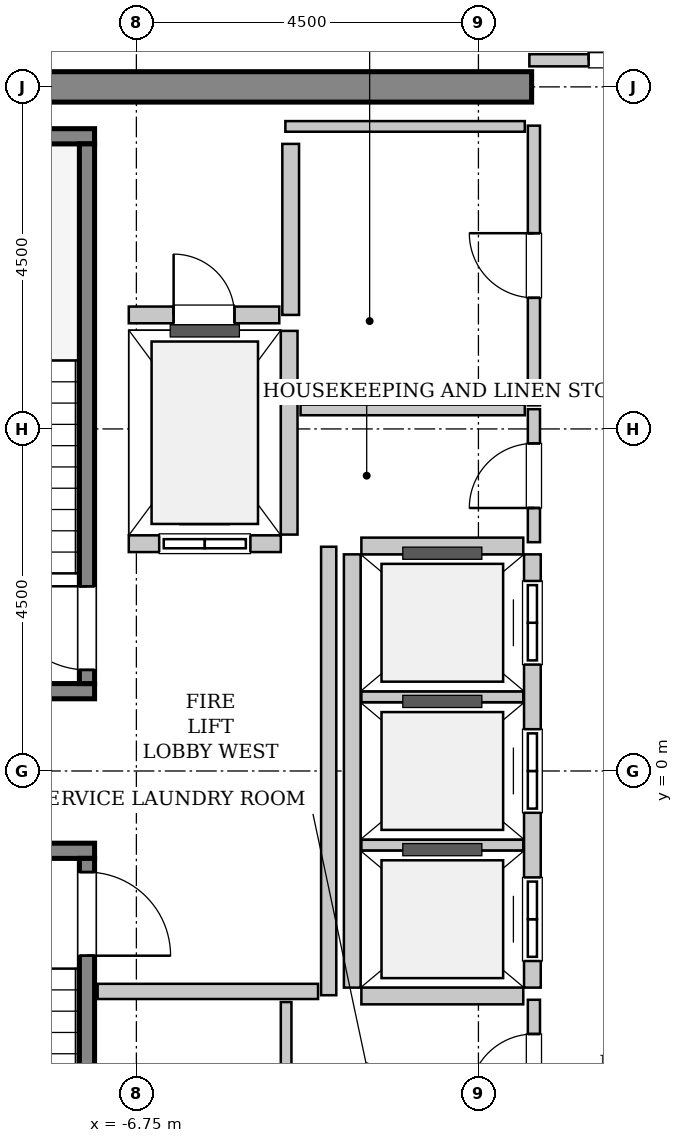
"""IFC4 building model, lengths in metres.
Left out: names, types, materials, properties, quantities, classifications, styles, units other than length and angle.
Written with IfcOpenShell. Run it as: python <this file> out.ifc"""

import sys

from ifc_helpers import new_model, si_unit, direction, frame, frame_2d, origin, place, context, subcontext, project, spatial, rectangle, extrude, source, transform, mapped, element, fill, save


model = new_model("IFC4")
c1 = context("Model", 3, precision=1e-05, world=origin(), true_north=direction((0.0, 1.0)))
c2 = subcontext(c1, "Body", "Model", "MODEL_VIEW")
j1 = project(units=[si_unit("LENGTHUNIT", "METRE"), si_unit("PLANEANGLEUNIT", "RADIAN")], contexts=[c1])
p1 = place(None, origin())
s1 = spatial("IfcSite", under=j1, at=p1, CompositionType="ELEMENT")
p2 = place(p1, origin())
s2 = spatial("IfcBuilding", under=s1, at=p2, CompositionType="ELEMENT")
p3 = place(p2, frame((0.0, 0.0, 333.8)))
s3 = spatial("IfcBuildingStorey", under=s2, at=p3, CompositionType="ELEMENT", Elevation=333.8)
m1 = source(origin(), c2, "Body", "SweptSolid", [
    extrude(rectangle(XDim=9.9, YDim=0.4, at=frame_2d((4.95, 0.0))), origin(), (0.0, 0.0, 1.0), 3.8),
])
p4 = place(p3, frame((-11.45, 9.0, 0.0), z_axis=(0.0, 0.0, 1.0), x_axis=(1.0, 0.0, 0.0)))
e1 = element("IfcWall", 1, at=p4, inside=s3, PredefinedType="SHEAR", context=c2, shape_type="MappedRepresentation", body=[
    mapped(m1, transform((0.0, 0.0, 0.0), x_axis=(1.0, 0.0, 0.0), y_axis=(0.0, 1.0, 0.0), z_axis=(0.0, 0.0, 1.0), scale=1.0)),
])
m2 = source(origin(), c2, "Body", "SweptSolid", [
    extrude(rectangle(XDim=3.4, YDim=0.2, at=frame_2d((1.7, 0.0))), origin(), (0.0, 0.0, 1.0), 3.8),
])
p5 = place(p3, frame((-7.3, 1.05, 0.0), z_axis=(0.0, 0.0, 1.0), x_axis=(-1.0, 0.0, 0.0)))
e2 = element("IfcWall", 2, at=p5, inside=s3, PredefinedType="SOLIDWALL", context=c2, shape_type="MappedRepresentation", body=[
    mapped(m2, transform((0.0, 0.0, 0.0), x_axis=(1.0, 0.0, 0.0), y_axis=(0.0, 1.0, 0.0), z_axis=(0.0, 0.0, 1.0), scale=1.0)),
])
m3 = source(origin(), c2, "Body", "SweptSolid", [
    extrude(rectangle(XDim=3.755, YDim=0.2, at=frame_2d((1.877, 0.0))), origin(), (0.0, 0.0, 1.0), 3.8),
])
p6 = place(p3, frame((-7.3, 8.35, 0.0), z_axis=(0.0, 0.0, 1.0), x_axis=(-1.0, 0.0, 0.0)))
e3 = element("IfcWall", 3, at=p6, inside=s3, PredefinedType="SOLIDWALL", context=c2, shape_type="MappedRepresentation", body=[
    mapped(m3, transform((0.0, 0.0, 0.0), x_axis=(1.0, 0.0, 0.0), y_axis=(0.0, 1.0, 0.0), z_axis=(0.0, 0.0, 1.0), scale=1.0)),
])
m4 = source(origin(), c2, "Body", "SweptSolid", [
    extrude(rectangle(XDim=7.1, YDim=0.2, at=frame_2d((3.55, 0.0))), origin(), (0.0, 0.0, 1.0), 3.8),
])
p7 = place(p3, frame((-7.4, 1.15, 0.0), z_axis=(0.0, 0.0, 1.0), x_axis=(0.0, 1.0, 0.0)))
e4 = element("IfcWall", 4, at=p7, inside=s3, PredefinedType="SOLIDWALL", context=c2, shape_type="MappedRepresentation", body=[
    mapped(m4, transform((0.0, 0.0, 0.0), x_axis=(1.0, 0.0, 0.0), y_axis=(0.0, 1.0, 0.0), z_axis=(0.0, 0.0, 1.0), scale=1.0)),
])
p8 = place(p7, frame((0.18, 0.0, 0.0)))
e5 = element("IfcOpeningElement", 5, at=p8, cuts=e4, PredefinedType="OPENING", context=c2, shape_type="SweptSolid", body=[
    extrude(rectangle(XDim=1.1, YDim=2.15, at=frame_2d((0.55, 1.075))), frame((0.0, 0.11, 0.0), z_axis=(0.0, -1.0, 0.0), x_axis=(1.0, 0.0, 0.0)), (0.0, 0.0, 1.0), 0.22),
])
p9 = place(p3, frame((-10.7, -1.05, 0.0), z_axis=(0.0, 0.0, 1.0), x_axis=(1.0, 0.0, 0.0)))
e6 = element("IfcWall", 6, at=p9, inside=s3, PredefinedType="SOLIDWALL", context=c2, shape_type="MappedRepresentation", body=[
    mapped(m2, transform((0.0, 0.0, 0.0), x_axis=(1.0, 0.0, 0.0), y_axis=(0.0, 1.0, 0.0), z_axis=(0.0, 0.0, 1.0), scale=1.0)),
])
p10 = place(p3, frame((-7.4, -1.15, 0.0), z_axis=(0.0, 0.0, 1.0), x_axis=(0.0, -1.0, 0.0)))
e7 = element("IfcWall", 7, at=p10, inside=s3, PredefinedType="SOLIDWALL", context=c2, shape_type="MappedRepresentation", body=[
    mapped(m4, transform((0.0, 0.0, 0.0), x_axis=(1.0, 0.0, 0.0), y_axis=(0.0, 1.0, 0.0), z_axis=(0.0, 0.0, 1.0), scale=1.0)),
])
p11 = place(p10, frame((0.18, 0.0, 0.0)))
e8 = element("IfcOpeningElement", 8, at=p11, cuts=e7, PredefinedType="OPENING", context=c2, shape_type="SweptSolid", body=[
    extrude(rectangle(XDim=1.1, YDim=2.15, at=frame_2d((0.55, 1.075))), frame((0.0, 0.11, 0.0), z_axis=(0.0, -1.0, 0.0), x_axis=(1.0, 0.0, 0.0)), (0.0, 0.0, 1.0), 0.22),
])
m5 = source(origin(), c2, "Body", "SweptSolid", [
    extrude(rectangle(XDim=2.0, YDim=0.22, at=frame_2d((1.0, 0.0))), origin(), (0.0, 0.0, 1.0), 3.535),
])
p12 = place(p3, frame((-6.85, 2.99, 0.0), z_axis=(0.0, 0.0, 1.0), x_axis=(1.0, 0.0, 0.0)))
e9 = element("IfcWall", 9, at=p12, inside=s3, PredefinedType="SOLIDWALL", context=c2, shape_type="MappedRepresentation", body=[
    mapped(m5, transform((0.0, 0.0, 0.0), x_axis=(1.0, 0.0, 0.0), y_axis=(0.0, 1.0, 0.0), z_axis=(0.0, 0.0, 1.0), scale=1.0)),
])
p13 = place(p12, frame((0.4, 0.0, 0.0)))
e10 = element("IfcOpeningElement", 10, at=p13, cuts=e9, PredefinedType="OPENING", context=c2, shape_type="SweptSolid", body=[
    extrude(rectangle(XDim=1.2, YDim=2.2, at=frame_2d((0.6, 1.1))), frame((0.0, 0.12, 0.0), z_axis=(0.0, -1.0, 0.0), x_axis=(1.0, 0.0, 0.0)), (0.0, 0.0, 1.0), 0.24),
])
m6 = source(origin(), c2, "Body", "SweptSolid", [
    extrude(rectangle(XDim=2.68, YDim=0.22, at=frame_2d((1.34, 0.0))), origin(), (0.0, 0.0, 1.0), 3.535),
])
p14 = place(p3, frame((-4.74, 3.11, 0.0), z_axis=(0.0, 0.0, 1.0), x_axis=(0.0, 1.0, 0.0)))
e11 = element("IfcWall", 11, at=p14, inside=s3, PredefinedType="SOLIDWALL", context=c2, shape_type="MappedRepresentation", body=[
    mapped(m6, transform((0.0, 0.0, 0.0), x_axis=(1.0, 0.0, 0.0), y_axis=(0.0, 1.0, 0.0), z_axis=(0.0, 0.0, 1.0), scale=1.0)),
])
m7 = source(origin(), c2, "Body", "SweptSolid", [
    extrude(rectangle(XDim=5.7, YDim=0.22, at=frame_2d((2.85, 0.0))), origin(), (0.0, 0.0, 1.0), 3.535),
])
p15 = place(p3, frame((-1.54, -2.85, 0.0), z_axis=(0.0, 0.0, 1.0), x_axis=(0.0, 1.0, 0.0)))
e12 = element("IfcWall", 12, at=p15, inside=s3, PredefinedType="SOLIDWALL", context=c2, shape_type="MappedRepresentation", body=[
    mapped(m7, transform((0.0, 0.0, 0.0), x_axis=(1.0, 0.0, 0.0), y_axis=(0.0, 1.0, 0.0), z_axis=(0.0, 0.0, 1.0), scale=1.0)),
])
p16 = place(p15, frame((0.35, 0.0, 0.0)))
e13 = element("IfcOpeningElement", 13, at=p16, cuts=e12, PredefinedType="OPENING", context=c2, shape_type="SweptSolid", body=[
    extrude(rectangle(XDim=1.1, YDim=2.2, at=frame_2d((0.55, 1.1))), frame((0.0, 0.12, 0.0), z_axis=(0.0, -1.0, 0.0), x_axis=(1.0, 0.0, 0.0)), (0.0, 0.0, 1.0), 0.24),
])
p17 = place(p15, frame((2.3, 0.0, 0.0)))
e14 = element("IfcOpeningElement", 14, at=p17, cuts=e12, PredefinedType="OPENING", context=c2, shape_type="SweptSolid", body=[
    extrude(rectangle(XDim=1.1, YDim=2.2, at=frame_2d((0.55, 1.1))), frame((0.0, 0.12, 0.0), z_axis=(0.0, -1.0, 0.0), x_axis=(1.0, 0.0, 0.0)), (0.0, 0.0, 1.0), 0.24),
])
p18 = place(p15, frame((4.25, 0.0, 0.0)))
e15 = element("IfcOpeningElement", 15, at=p18, cuts=e12, PredefinedType="OPENING", context=c2, shape_type="SweptSolid", body=[
    extrude(rectangle(XDim=1.1, YDim=2.2, at=frame_2d((0.55, 1.1))), frame((0.0, 0.12, 0.0), z_axis=(0.0, -1.0, 0.0), x_axis=(1.0, 0.0, 0.0)), (0.0, 0.0, 1.0), 0.24),
])
p19 = place(p3, frame((-3.91, 2.85, 0.0), z_axis=(0.0, 0.0, 1.0), x_axis=(0.0, -1.0, 0.0)))
e16 = element("IfcWall", 16, at=p19, inside=s3, PredefinedType="SOLIDWALL", context=c2, shape_type="MappedRepresentation", body=[
    mapped(m7, transform((0.0, 0.0, 0.0), x_axis=(1.0, 0.0, 0.0), y_axis=(0.0, 1.0, 0.0), z_axis=(0.0, 0.0, 1.0), scale=1.0)),
])
m8 = source(origin(), c2, "Body", "SweptSolid", [
    extrude(rectangle(XDim=2.13, YDim=0.22, at=frame_2d((1.065, 0.0))), origin(), (0.0, 0.0, 1.0), 3.535),
])
p20 = place(p3, frame((-3.79, -2.96, 0.0), z_axis=(0.0, 0.0, 1.0), x_axis=(1.0, 0.0, 0.0)))
e17 = element("IfcWall", 17, at=p20, inside=s3, PredefinedType="SOLIDWALL", context=c2, shape_type="MappedRepresentation", body=[
    mapped(m8, transform((0.0, 0.0, 0.0), x_axis=(1.0, 0.0, 0.0), y_axis=(0.0, 1.0, 0.0), z_axis=(0.0, 0.0, 1.0), scale=1.0)),
])
m9 = source(origin(), c2, "Body", "SweptSolid", [
    extrude(rectangle(XDim=2.13, YDim=0.14, at=frame_2d((1.065, 0.0))), origin(), (0.0, 0.0, 1.0), 3.535),
])
for number, where, z_axis, x_axis in (
    (18, (-3.79, -0.975, 0.0), (0.0, 0.0, 1.0), (1.0, 0.0, 0.0)),
    (19, (-3.79, 0.975, 0.0), (0.0, 0.0, 1.0), (1.0, 0.0, 0.0)),
):
    element("IfcWall", number, at=place(p3, frame(where, z_axis=z_axis, x_axis=x_axis)), inside=s3, PredefinedType="PARTITIONING", context=c2, shape_type="MappedRepresentation", body=[
        mapped(m9, transform((0.0, 0.0, 0.0), x_axis=(1.0, 0.0, 0.0), y_axis=(0.0, 1.0, 0.0), z_axis=(0.0, 0.0, 1.0), scale=1.0)),
    ])
p21 = place(p3, frame((-1.66, 2.96, 0.0), z_axis=(0.0, 0.0, 1.0), x_axis=(-1.0, 0.0, 0.0)))
e20 = element("IfcWall", 20, at=p21, inside=s3, PredefinedType="SOLIDWALL", context=c2, shape_type="MappedRepresentation", body=[
    mapped(m8, transform((0.0, 0.0, 0.0), x_axis=(1.0, 0.0, 0.0), y_axis=(0.0, 1.0, 0.0), z_axis=(0.0, 0.0, 1.0), scale=1.0)),
])
m10 = source(origin(), c2, "Body", "SweptSolid", [
    extrude(rectangle(XDim=2.25, YDim=0.22, at=frame_2d((1.125, 0.0))), origin(), (0.0, 0.0, 1.0), 3.535),
])
p22 = place(p3, frame((-4.72, 6.0, 0.0), z_axis=(0.0, 0.0, 1.0), x_axis=(0.0, 1.0, 0.0)))
e21 = element("IfcWall", 21, at=p22, inside=s3, PredefinedType="SOLIDWALL", context=c2, shape_type="MappedRepresentation", body=[
    mapped(m10, transform((0.0, 0.0, 0.0), x_axis=(1.0, 0.0, 0.0), y_axis=(0.0, 1.0, 0.0), z_axis=(0.0, 0.0, 1.0), scale=1.0)),
])
m11 = source(origin(), c2, "Body", "SweptSolid", [
    extrude(rectangle(XDim=1.98, YDim=0.22, at=frame_2d((0.99, 0.0))), origin(), (0.0, 0.0, 1.0), 3.535),
])
p23 = place(p3, frame((-6.85, 6.0, 0.0), z_axis=(0.0, 0.0, 1.0), x_axis=(1.0, 0.0, 0.0)))
e22 = element("IfcWall", 22, at=p23, inside=s3, PredefinedType="SOLIDWALL", context=c2, shape_type="MappedRepresentation", body=[
    mapped(m11, transform((0.0, 0.0, 0.0), x_axis=(1.0, 0.0, 0.0), y_axis=(0.0, 1.0, 0.0), z_axis=(0.0, 0.0, 1.0), scale=1.0)),
])
p24 = place(p23, frame((0.59, 0.0, 0.0)))
e23 = element("IfcOpeningElement", 23, at=p24, cuts=e22, PredefinedType="OPENING", context=c2, shape_type="SweptSolid", body=[
    extrude(rectangle(XDim=0.8, YDim=2.0, at=frame_2d((0.4, 1.0))), frame((0.0, 0.12, 0.0), z_axis=(0.0, -1.0, 0.0), x_axis=(1.0, 0.0, 0.0)), (0.0, 0.0, 1.0), 0.24),
])
m12 = source(origin(), c2, "Body", "SweptSolid", [
    extrude(rectangle(XDim=5.9, YDim=0.2, at=frame_2d((2.95, 0.0))), origin(), (0.0, 0.0, 1.0), 3.535),
])
p25 = place(p3, frame((-4.22, -2.95, 0.0), z_axis=(0.0, 0.0, 1.0), x_axis=(0.0, 1.0, 0.0)))
e24 = element("IfcWall", 24, at=p25, inside=s3, PredefinedType="PARTITIONING", context=c2, shape_type="MappedRepresentation", body=[
    mapped(m12, transform((0.0, 0.0, 0.0), x_axis=(1.0, 0.0, 0.0), y_axis=(0.0, 1.0, 0.0), z_axis=(0.0, 0.0, 1.0), scale=1.0)),
])
m13 = source(origin(), c2, "Body", "SweptSolid", [
    extrude(rectangle(XDim=2.9, YDim=0.2, at=frame_2d((1.45, 0.0))), origin(), (0.0, 0.0, 1.0), 3.535),
])
p26 = place(p3, frame((-7.26, -2.9, 0.0), z_axis=(0.0, 0.0, 1.0), x_axis=(1.0, 0.0, 0.0)))
e25 = element("IfcWall", 25, at=p26, inside=s3, PredefinedType="PARTITIONING", context=c2, shape_type="MappedRepresentation", body=[
    mapped(m13, transform((0.0, 0.0, 0.0), x_axis=(1.0, 0.0, 0.0), y_axis=(0.0, 1.0, 0.0), z_axis=(0.0, 0.0, 1.0), scale=1.0)),
])
m14 = source(origin(), c2, "Body", "SweptSolid", [
    extrude(rectangle(XDim=3.16, YDim=0.16, at=frame_2d((1.58, 0.0))), origin(), (0.0, 0.0, 1.0), 2.625),
])
p27 = place(p3, frame((-1.58, 9.35, 0.0), z_axis=(0.0, 0.0, 1.0), x_axis=(1.0, 0.0, 0.0)))
e26 = element("IfcWall", 26, at=p27, inside=s3, PredefinedType="PARTITIONING", context=c2, shape_type="MappedRepresentation", body=[
    mapped(m14, transform((0.0, 0.0, 0.0), x_axis=(1.0, 0.0, 0.0), y_axis=(0.0, 1.0, 0.0), z_axis=(0.0, 0.0, 1.0), scale=1.0)),
])
p28 = place(p27, frame((0.78, 0.0, 0.0)))
e27 = element("IfcOpeningElement", 27, at=p28, cuts=e26, PredefinedType="OPENING", context=c2, shape_type="SweptSolid", body=[
    extrude(rectangle(XDim=1.6, YDim=2.3, at=frame_2d((0.8, 1.15))), frame((0.0, 0.09, 0.0), z_axis=(0.0, -1.0, 0.0), x_axis=(1.0, 0.0, 0.0)), (0.0, 0.0, 1.0), 0.18),
])
m15 = source(origin(), c2, "Body", "SweptSolid", [
    extrude(rectangle(XDim=1.75, YDim=0.16, at=frame_2d((0.875, 0.0))), origin(), (0.0, 0.0, 1.0), 3.535),
])
p29 = place(p3, frame((-1.52, 3.01, 0.0), z_axis=(0.0, 0.0, 1.0), x_axis=(0.0, 1.0, 0.0)))
e28 = element("IfcWall", 28, at=p29, inside=s3, PredefinedType="PARTITIONING", context=c2, shape_type="MappedRepresentation", body=[
    mapped(m15, transform((0.0, 0.0, 0.0), x_axis=(1.0, 0.0, 0.0), y_axis=(0.0, 1.0, 0.0), z_axis=(0.0, 0.0, 1.0), scale=1.0)),
])
p30 = place(p29, frame((0.45, 0.0, 0.0)))
e29 = element("IfcOpeningElement", 29, at=p30, cuts=e28, PredefinedType="OPENING", context=c2, shape_type="SweptSolid", body=[
    extrude(rectangle(XDim=0.85, YDim=2.1, at=frame_2d((0.425, 1.05))), frame((0.0, 0.09, 0.0), z_axis=(0.0, -1.0, 0.0), x_axis=(1.0, 0.0, 0.0)), (0.0, 0.0, 1.0), 0.18),
])
m16 = source(origin(), c2, "Body", "SweptSolid", [
    extrude(rectangle(XDim=2.95, YDim=0.14, at=frame_2d((1.475, 0.0))), origin(), (0.0, 0.0, 1.0), 3.535),
])
p31 = place(p3, frame((-4.59, 4.75, 0.0), z_axis=(0.0, 0.0, 1.0), x_axis=(1.0, 0.0, 0.0)))
e30 = element("IfcWall", 30, at=p31, inside=s3, PredefinedType="PARTITIONING", context=c2, shape_type="MappedRepresentation", body=[
    mapped(m16, transform((0.0, 0.0, 0.0), x_axis=(1.0, 0.0, 0.0), y_axis=(0.0, 1.0, 0.0), z_axis=(0.0, 0.0, 1.0), scale=1.0)),
])
m17 = source(origin(), c2, "Body", "SweptSolid", [
    extrude(rectangle(XDim=3.68, YDim=0.16, at=frame_2d((1.84, 0.0))), origin(), (0.0, 0.0, 1.0), 3.535),
])
p32 = place(p3, frame((-1.52, 4.81, 0.0), z_axis=(0.0, 0.0, 1.0), x_axis=(0.0, 1.0, 0.0)))
e31 = element("IfcWall", 31, at=p32, inside=s3, PredefinedType="PARTITIONING", context=c2, shape_type="MappedRepresentation", body=[
    mapped(m17, transform((0.0, 0.0, 0.0), x_axis=(1.0, 0.0, 0.0), y_axis=(0.0, 1.0, 0.0), z_axis=(0.0, 0.0, 1.0), scale=1.0)),
])
p33 = place(p32, frame((1.415, 0.0, 0.0)))
e32 = element("IfcOpeningElement", 32, at=p33, cuts=e31, PredefinedType="OPENING", context=c2, shape_type="SweptSolid", body=[
    extrude(rectangle(XDim=0.85, YDim=2.1, at=frame_2d((0.425, 1.05))), frame((0.0, 0.09, 0.0), z_axis=(0.0, -1.0, 0.0), x_axis=(1.0, 0.0, 0.0)), (0.0, 0.0, 1.0), 0.18),
])
m18 = source(origin(), c2, "Body", "SweptSolid", [
    extrude(rectangle(XDim=3.15, YDim=0.14, at=frame_2d((1.575, 0.0))), origin(), (0.0, 0.0, 1.0), 3.535),
])
p34 = place(p3, frame((-4.79, 8.48, 0.0), z_axis=(0.0, 0.0, 1.0), x_axis=(1.0, 0.0, 0.0)))
e33 = element("IfcWall", 33, at=p34, inside=s3, PredefinedType="PARTITIONING", context=c2, shape_type="MappedRepresentation", body=[
    mapped(m18, transform((0.0, 0.0, 0.0), x_axis=(1.0, 0.0, 0.0), y_axis=(0.0, 1.0, 0.0), z_axis=(0.0, 0.0, 1.0), scale=1.0)),
])
p35 = place(p3, frame((-1.52, -4.76, 0.0), z_axis=(0.0, 0.0, 1.0), x_axis=(0.0, 1.0, 0.0)))
e34 = element("IfcWall", 34, at=p35, inside=s3, PredefinedType="PARTITIONING", context=c2, shape_type="MappedRepresentation", body=[
    mapped(m15, transform((0.0, 0.0, 0.0), x_axis=(1.0, 0.0, 0.0), y_axis=(0.0, 1.0, 0.0), z_axis=(0.0, 0.0, 1.0), scale=1.0)),
])
p36 = place(p35, frame((0.45, 0.0, 0.0)))
e35 = element("IfcOpeningElement", 35, at=p36, cuts=e34, PredefinedType="OPENING", context=c2, shape_type="SweptSolid", body=[
    extrude(rectangle(XDim=0.85, YDim=2.1, at=frame_2d((0.425, 1.05))), frame((0.0, 0.09, 0.0), z_axis=(0.0, -1.0, 0.0), x_axis=(1.0, 0.0, 0.0)), (0.0, 0.0, 1.0), 0.18),
])
m19 = source(origin(), c2, "Body", "SweptSolid", [
    extrude(rectangle(XDim=1.6, YDim=0.14, at=frame_2d((0.8, 0.0))), origin(), (0.0, 0.0, 1.0), 3.535),
])
p37 = place(p3, frame((-4.78, -4.64, 0.0), z_axis=(0.0, 0.0, 1.0), x_axis=(0.0, 1.0, 0.0)))
e36 = element("IfcWall", 36, at=p37, inside=s3, PredefinedType="PARTITIONING", context=c2, shape_type="MappedRepresentation", body=[
    mapped(m19, transform((0.0, 0.0, 0.0), x_axis=(1.0, 0.0, 0.0), y_axis=(0.0, 1.0, 0.0), z_axis=(0.0, 0.0, 1.0), scale=1.0)),
])
m20 = source(origin(), c2, "Body", "SweptSolid", [
    extrude(rectangle(XDim=1.1, YDim=2.15, at=frame_2d((0.55, 1.075))), frame((0.0, 0.025, 0.0), z_axis=(0.0, -1.0, 0.0), x_axis=(1.0, 0.0, 0.0)), (0.0, 0.0, 1.0), 0.05),
])
p38 = place(p8, origin())
e37 = element("IfcDoor", 37, at=p38, inside=s3, OperationType="SINGLE_SWING_RIGHT", PredefinedType="DOOR", context=c2, shape_type="MappedRepresentation", body=[
    mapped(m20, transform((0.0, 0.0, 0.0), x_axis=(1.0, 0.0, 0.0), y_axis=(0.0, 1.0, 0.0), z_axis=(0.0, 0.0, 1.0), scale=1.0)),
])
fill(e5, e37)
p39 = place(p11, origin())
e38 = element("IfcDoor", 38, at=p39, inside=s3, OperationType="SINGLE_SWING_RIGHT", PredefinedType="DOOR", context=c2, shape_type="MappedRepresentation", body=[
    mapped(m20, transform((0.0, 0.0, 0.0), x_axis=(1.0, 0.0, 0.0), y_axis=(0.0, 1.0, 0.0), z_axis=(0.0, 0.0, 1.0), scale=1.0)),
])
fill(e8, e38)
m21 = source(origin(), c2, "Body", "SweptSolid", [
    extrude(rectangle(XDim=1.2, YDim=2.2, at=frame_2d((0.6, 1.1))), frame((0.0, 0.025, 0.0), z_axis=(0.0, -1.0, 0.0), x_axis=(1.0, 0.0, 0.0)), (0.0, 0.0, 1.0), 0.05),
])
p40 = place(p13, origin())
e39 = element("IfcDoor", 39, at=p40, inside=s3, OperationType="SLIDING_TO_LEFT", PredefinedType="DOOR", context=c2, shape_type="MappedRepresentation", body=[
    mapped(m21, transform((0.0, 0.0, 0.0), x_axis=(1.0, 0.0, 0.0), y_axis=(0.0, 1.0, 0.0), z_axis=(0.0, 0.0, 1.0), scale=1.0)),
])
fill(e10, e39)
m22 = source(origin(), c2, "Body", "SweptSolid", [
    extrude(rectangle(XDim=1.1, YDim=2.2, at=frame_2d((0.55, 1.1))), frame((0.0, 0.025, 0.0), z_axis=(0.0, -1.0, 0.0), x_axis=(1.0, 0.0, 0.0)), (0.0, 0.0, 1.0), 0.05),
])
p41 = place(p16, origin())
e40 = element("IfcDoor", 40, at=p41, inside=s3, OperationType="DOUBLE_DOOR_SLIDING", PredefinedType="DOOR", context=c2, shape_type="MappedRepresentation", body=[
    mapped(m22, transform((0.0, 0.0, 0.0), x_axis=(1.0, 0.0, 0.0), y_axis=(0.0, 1.0, 0.0), z_axis=(0.0, 0.0, 1.0), scale=1.0)),
])
fill(e13, e40)
p42 = place(p17, origin())
e41 = element("IfcDoor", 41, at=p42, inside=s3, OperationType="DOUBLE_DOOR_SLIDING", PredefinedType="DOOR", context=c2, shape_type="MappedRepresentation", body=[
    mapped(m22, transform((0.0, 0.0, 0.0), x_axis=(1.0, 0.0, 0.0), y_axis=(0.0, 1.0, 0.0), z_axis=(0.0, 0.0, 1.0), scale=1.0)),
])
fill(e14, e41)
p43 = place(p18, origin())
e42 = element("IfcDoor", 42, at=p43, inside=s3, OperationType="DOUBLE_DOOR_SLIDING", PredefinedType="DOOR", context=c2, shape_type="MappedRepresentation", body=[
    mapped(m22, transform((0.0, 0.0, 0.0), x_axis=(1.0, 0.0, 0.0), y_axis=(0.0, 1.0, 0.0), z_axis=(0.0, 0.0, 1.0), scale=1.0)),
])
fill(e15, e42)
m23 = source(origin(), c2, "Body", "SweptSolid", [
    extrude(rectangle(XDim=0.8, YDim=2.0, at=frame_2d((0.4, 1.0))), frame((0.0, 0.025, 0.0), z_axis=(0.0, -1.0, 0.0), x_axis=(1.0, 0.0, 0.0)), (0.0, 0.0, 1.0), 0.05),
])
p44 = place(p24, origin())
e43 = element("IfcDoor", 43, at=p44, inside=s3, OperationType="SINGLE_SWING_LEFT", PredefinedType="TRAPDOOR", context=c2, shape_type="MappedRepresentation", body=[
    mapped(m23, transform((0.0, 0.0, 0.0), x_axis=(1.0, 0.0, 0.0), y_axis=(0.0, 1.0, 0.0), z_axis=(0.0, 0.0, 1.0), scale=1.0)),
])
fill(e23, e43)
m24 = source(origin(), c2, "Body", "SweptSolid", [
    extrude(rectangle(XDim=1.6, YDim=2.3, at=frame_2d((0.8, 1.15))), frame((0.0, 0.025, 0.0), z_axis=(0.0, -1.0, 0.0), x_axis=(1.0, 0.0, 0.0)), (0.0, 0.0, 1.0), 0.05),
])
p45 = place(p28, origin())
e44 = element("IfcDoor", 44, at=p45, inside=s3, OperationType="DOUBLE_DOOR_SINGLE_SWING", PredefinedType="DOOR", context=c2, shape_type="MappedRepresentation", body=[
    mapped(m24, transform((0.0, 0.0, 0.0), x_axis=(1.0, 0.0, 0.0), y_axis=(0.0, 1.0, 0.0), z_axis=(0.0, 0.0, 1.0), scale=1.0)),
])
fill(e27, e44)
m25 = source(origin(), c2, "Body", "SweptSolid", [
    extrude(rectangle(XDim=0.85, YDim=2.1, at=frame_2d((0.425, 1.05))), frame((0.0, 0.025, 0.0), z_axis=(0.0, -1.0, 0.0), x_axis=(1.0, 0.0, 0.0)), (0.0, 0.0, 1.0), 0.05),
])
p46 = place(p30, origin())
e45 = element("IfcDoor", 45, at=p46, inside=s3, OperationType="SINGLE_SWING_LEFT", PredefinedType="DOOR", context=c2, shape_type="MappedRepresentation", body=[
    mapped(m25, transform((0.0, 0.0, 0.0), x_axis=(1.0, 0.0, 0.0), y_axis=(0.0, 1.0, 0.0), z_axis=(0.0, 0.0, 1.0), scale=1.0)),
])
fill(e29, e45)
p47 = place(p33, origin())
e46 = element("IfcDoor", 46, at=p47, inside=s3, OperationType="SINGLE_SWING_RIGHT", PredefinedType="DOOR", context=c2, shape_type="MappedRepresentation", body=[
    mapped(m25, transform((0.0, 0.0, 0.0), x_axis=(1.0, 0.0, 0.0), y_axis=(0.0, 1.0, 0.0), z_axis=(0.0, 0.0, 1.0), scale=1.0)),
])
fill(e32, e46)
p48 = place(p36, origin())
e47 = element("IfcDoor", 47, at=p48, inside=s3, OperationType="SINGLE_SWING_LEFT", PredefinedType="DOOR", context=c2, shape_type="MappedRepresentation", body=[
    mapped(m25, transform((0.0, 0.0, 0.0), x_axis=(1.0, 0.0, 0.0), y_axis=(0.0, 1.0, 0.0), z_axis=(0.0, 0.0, 1.0), scale=1.0)),
])
fill(e35, e47)
save(model, sys.argv[1])
